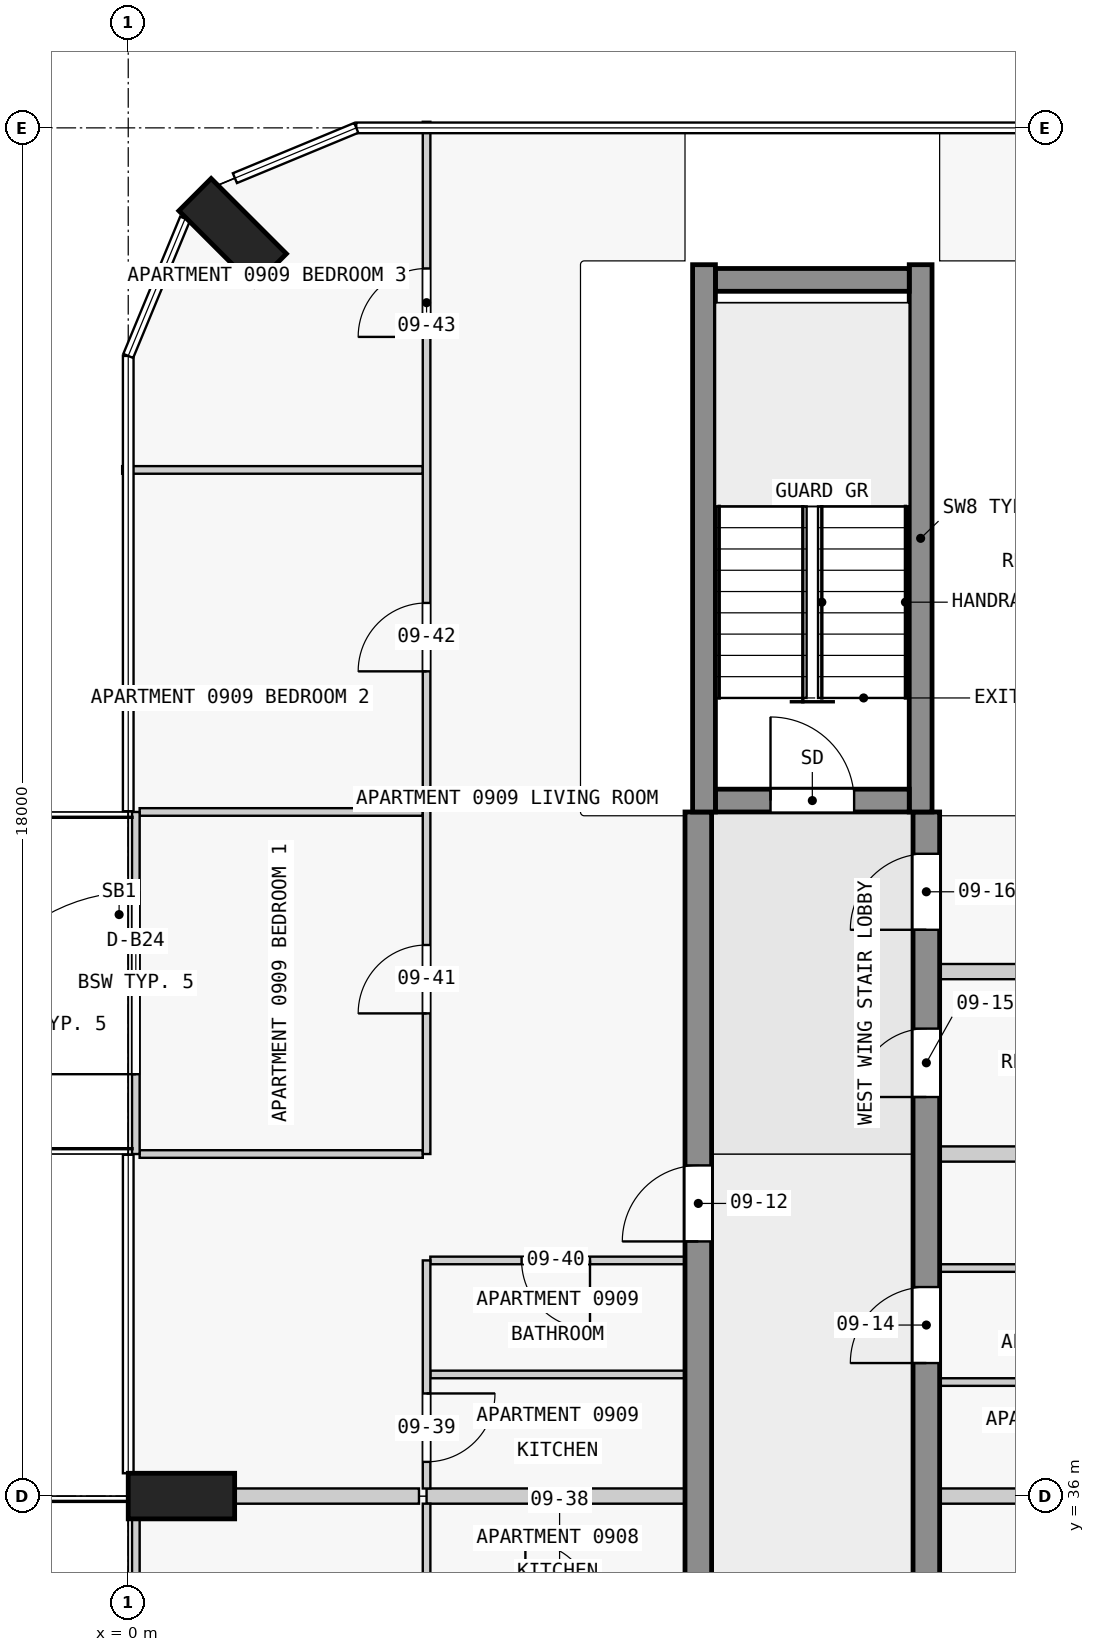
"""IFC4 building model, lengths in metres.
Left out: names, types, materials, properties, quantities, classifications, styles, units other than length and angle.
Written with IfcOpenShell. Run it as: python <this file> out.ifc"""

import sys

from ifc_helpers import new_model, si_unit, direction, frame, frame_2d, origin, origin_2d, place, context, subcontext, project, spatial, rectangle, extrude, element, fill, save


model = new_model("IFC4")
c1 = context("Model", 3, precision=1e-05, world=origin(), true_north=direction((0.0, 1.0)))
c2 = subcontext(c1, "Body", "Model", "MODEL_VIEW")
j1 = project(units=[si_unit("LENGTHUNIT", "METRE"), si_unit("PLANEANGLEUNIT", "RADIAN")], contexts=[c1])
p1 = place(None, origin())
s1 = spatial("IfcSite", under=j1, at=p1, CompositionType="ELEMENT")
p2 = place(p1, origin())
s2 = spatial("IfcBuilding", under=s1, at=p2, CompositionType="ELEMENT")
p3 = place(p2, frame((0.0, 0.0, 40.8)))
s3 = spatial("IfcBuildingStorey", under=s2, at=p3, CompositionType="ELEMENT", Elevation=40.8)
for number, where, z_axis, x_axis in (
    (1, (1.374, 52.626, 0.0), (0.0, 0.0, 1.0), (0.707, 0.707, 0.0)),
    (2, (0.7, 36.0, 0.0), (0.0, 0.0, 1.0), (0.0, 1.0, 0.0)),
):
    element("IfcColumn", number, at=place(p3, frame(where, z_axis=z_axis, x_axis=x_axis)), inside=s3, PredefinedType="COLUMN", context=c2, shape_type="SweptSolid", body=[
        extrude(rectangle(XDim=0.6, YDim=1.4, at=origin_2d()), origin(), (0.0, 0.0, 1.0), 3.5),
    ])
p4 = place(p3, frame((7.725, 45.15, 0.0), z_axis=(0.0, 0.0, 1.0), x_axis=(1.0, 0.0, 0.0)))
e3 = element("IfcWall", 3, at=p4, inside=s3, PredefinedType="SHEAR", context=c2, shape_type="SweptSolid", body=[
    extrude(rectangle(XDim=2.55, YDim=0.3, at=frame_2d((1.275, 0.0))), origin(), (0.0, 0.0, 1.0), 3.5),
])
p5 = place(p4, frame((0.725, 0.0, 0.0)))
e4 = element("IfcOpeningElement", 4, at=p5, cuts=e3, PredefinedType="OPENING", context=c2, shape_type="SweptSolid", body=[
    extrude(rectangle(XDim=1.1, YDim=2.1, at=frame_2d((0.55, 1.05))), frame((0.0, 0.16, 0.0), z_axis=(0.0, -1.0, 0.0), x_axis=(1.0, 0.0, 0.0)), (0.0, 0.0, 1.0), 0.32),
])
p6 = place(p3, frame((7.725, 52.0, 0.0), z_axis=(0.0, 0.0, 1.0), x_axis=(1.0, 0.0, 0.0)))
e5 = element("IfcWall", 5, at=p6, inside=s3, PredefinedType="SHEAR", context=c2, shape_type="SweptSolid", body=[
    extrude(rectangle(XDim=2.55, YDim=0.3, at=frame_2d((1.275, 0.0))), origin(), (0.0, 0.0, 1.0), 3.5),
])
for number, where, z_axis, x_axis in (
    (6, (7.575, 45.0, 0.0), (0.0, 0.0, 1.0), (0.0, 1.0, 0.0)),
    (7, (10.425, 45.0, 0.0), (0.0, 0.0, 1.0), (0.0, 1.0, 0.0)),
):
    element("IfcWall", number, at=place(p3, frame(where, z_axis=z_axis, x_axis=x_axis)), inside=s3, PredefinedType="SHEAR", context=c2, shape_type="SweptSolid", body=[
        extrude(rectangle(XDim=7.2, YDim=0.3, at=frame_2d((3.6, 0.0))), origin(), (0.0, 0.0, 1.0), 3.5),
    ])
p7 = place(p3, frame((7.5, 18.0, 0.0), z_axis=(0.0, 0.0, 1.0), x_axis=(0.0, 1.0, 0.0)))
e8 = element("IfcWall", 8, at=p7, inside=s3, PredefinedType="SHEAR", context=c2, shape_type="SweptSolid", body=[
    extrude(rectangle(XDim=27.0, YDim=0.35, at=frame_2d((13.5, 0.0))), origin(), (0.0, 0.0, 1.0), 3.25),
])
p8 = place(p7, frame((1.75, 0.0, 0.0)))
e9 = element("IfcOpeningElement", 9, at=p8, cuts=e8, PredefinedType="OPENING", context=c2, shape_type="SweptSolid", body=[
    extrude(rectangle(XDim=1.0, YDim=2.1, at=frame_2d((0.5, 1.05))), frame((0.0, 0.185, 0.0), z_axis=(0.0, -1.0, 0.0), x_axis=(1.0, 0.0, 0.0)), (0.0, 0.0, 1.0), 0.37),
])
p9 = place(p7, frame((8.55, 0.0, 0.0)))
e10 = element("IfcOpeningElement", 10, at=p9, cuts=e8, PredefinedType="OPENING", context=c2, shape_type="SweptSolid", body=[
    extrude(rectangle(XDim=1.0, YDim=2.1, at=frame_2d((0.5, 1.05))), frame((0.0, 0.185, 0.0), z_axis=(0.0, -1.0, 0.0), x_axis=(1.0, 0.0, 0.0)), (0.0, 0.0, 1.0), 0.37),
])
p10 = place(p7, frame((15.25, 0.0, 0.0)))
e11 = element("IfcOpeningElement", 11, at=p10, cuts=e8, PredefinedType="OPENING", context=c2, shape_type="SweptSolid", body=[
    extrude(rectangle(XDim=1.0, YDim=2.1, at=frame_2d((0.5, 1.05))), frame((0.0, 0.185, 0.0), z_axis=(0.0, -1.0, 0.0), x_axis=(1.0, 0.0, 0.0)), (0.0, 0.0, 1.0), 0.37),
])
p11 = place(p7, frame((21.35, 0.0, 0.0)))
e12 = element("IfcOpeningElement", 12, at=p11, cuts=e8, PredefinedType="OPENING", context=c2, shape_type="SweptSolid", body=[
    extrude(rectangle(XDim=1.0, YDim=2.1, at=frame_2d((0.5, 1.05))), frame((0.0, 0.185, 0.0), z_axis=(0.0, -1.0, 0.0), x_axis=(1.0, 0.0, 0.0)), (0.0, 0.0, 1.0), 0.37),
])
p12 = place(p3, frame((10.5, 18.0, 0.0), z_axis=(0.0, 0.0, 1.0), x_axis=(0.0, 1.0, 0.0)))
e13 = element("IfcWall", 13, at=p12, inside=s3, PredefinedType="SHEAR", context=c2, shape_type="SweptSolid", body=[
    extrude(rectangle(XDim=27.0, YDim=0.35, at=frame_2d((13.5, 0.0))), origin(), (0.0, 0.0, 1.0), 3.25),
])
p13 = place(p12, frame((7.45, 0.0, 0.0)))
e14 = element("IfcOpeningElement", 14, at=p13, cuts=e13, PredefinedType="OPENING", context=c2, shape_type="SweptSolid", body=[
    extrude(rectangle(XDim=1.0, YDim=2.1, at=frame_2d((0.5, 1.05))), frame((0.0, 0.185, 0.0), z_axis=(0.0, -1.0, 0.0), x_axis=(1.0, 0.0, 0.0)), (0.0, 0.0, 1.0), 0.37),
])
p14 = place(p12, frame((19.75, 0.0, 0.0)))
e15 = element("IfcOpeningElement", 15, at=p14, cuts=e13, PredefinedType="OPENING", context=c2, shape_type="SweptSolid", body=[
    extrude(rectangle(XDim=1.0, YDim=2.1, at=frame_2d((0.5, 1.05))), frame((0.0, 0.185, 0.0), z_axis=(0.0, -1.0, 0.0), x_axis=(1.0, 0.0, 0.0)), (0.0, 0.0, 1.0), 0.37),
])
p15 = place(p12, frame((23.25, 0.0, 0.0)))
e16 = element("IfcOpeningElement", 16, at=p15, cuts=e13, PredefinedType="OPENING", context=c2, shape_type="SweptSolid", body=[
    extrude(rectangle(XDim=0.9, YDim=2.1, at=frame_2d((0.45, 1.05))), frame((0.0, 0.185, 0.0), z_axis=(0.0, -1.0, 0.0), x_axis=(1.0, 0.0, 0.0)), (0.0, 0.0, 1.0), 0.37),
])
p16 = place(p12, frame((25.45, 0.0, 0.0)))
e17 = element("IfcOpeningElement", 17, at=p16, cuts=e13, PredefinedType="OPENING", context=c2, shape_type="SweptSolid", body=[
    extrude(rectangle(XDim=1.0, YDim=2.1, at=frame_2d((0.5, 1.05))), frame((0.0, 0.185, 0.0), z_axis=(0.0, -1.0, 0.0), x_axis=(1.0, 0.0, 0.0)), (0.0, 0.0, 1.0), 0.37),
])
p17 = place(p3, frame((0.1, 31.5, 0.0), z_axis=(0.0, 0.0, 1.0), x_axis=(0.0, 1.0, 0.0)))
e18 = element("IfcWall", 18, at=p17, inside=s3, PredefinedType="STANDARD", context=c2, shape_type="SweptSolid", body=[
    extrude(rectangle(XDim=4.5, YDim=0.1, at=frame_2d((2.25, 0.0))), origin(), (0.0, 0.0, 1.0), 3.25),
])
p18 = place(p17, frame((1.05, 0.0, 0.0)))
e19 = element("IfcOpeningElement", 19, at=p18, cuts=e18, PredefinedType="OPENING", context=c2, shape_type="SweptSolid", body=[
    extrude(rectangle(XDim=2.4, YDim=2.4, at=frame_2d((1.2, 1.2))), frame((0.0, 0.06, 0.0), z_axis=(0.0, -1.0, 0.0), x_axis=(1.0, 0.0, 0.0)), (0.0, 0.0, 1.0), 0.12),
])
p19 = place(p3, frame((0.1, 40.5, 0.0), z_axis=(0.0, 0.0, 1.0), x_axis=(0.0, 1.0, 0.0)))
e20 = element("IfcWall", 20, at=p19, inside=s3, PredefinedType="STANDARD", context=c2, shape_type="SweptSolid", body=[
    extrude(rectangle(XDim=4.5, YDim=0.1, at=frame_2d((2.25, 0.0))), origin(), (0.0, 0.0, 1.0), 3.25),
])
p20 = place(p19, frame((1.05, 0.0, 0.0)))
e21 = element("IfcOpeningElement", 21, at=p20, cuts=e20, PredefinedType="OPENING", context=c2, shape_type="SweptSolid", body=[
    extrude(rectangle(XDim=2.4, YDim=2.4, at=frame_2d((1.2, 1.2))), frame((0.0, 0.06, 0.0), z_axis=(0.0, -1.0, 0.0), x_axis=(1.0, 0.0, 0.0)), (0.0, 0.0, 1.0), 0.12),
])
p21 = place(p3, frame((7.325, 36.0, 0.0), z_axis=(0.0, 0.0, 1.0), x_axis=(-1.0, 0.0, 0.0)))
e22 = element("IfcWall", 22, at=p21, inside=s3, PredefinedType="PARTITIONING", context=c2, shape_type="SweptSolid", body=[
    extrude(rectangle(XDim=3.4, YDim=0.2, at=frame_2d((1.7, 0.0))), origin(), (0.0, 0.0, 1.0), 3.25),
])
p22 = place(p3, frame((16.6, 36.0, 0.0), z_axis=(0.0, 0.0, 1.0), x_axis=(-1.0, 0.0, 0.0)))
e23 = element("IfcWall", 23, at=p22, inside=s3, PredefinedType="PARTITIONING", context=c2, shape_type="SweptSolid", body=[
    extrude(rectangle(XDim=5.925, YDim=0.2, at=frame_2d((2.962, 0.0))), origin(), (0.0, 0.0, 1.0), 3.25),
])
p23 = place(p3, frame((1.4, 36.0, 0.0), z_axis=(0.0, 0.0, 1.0), x_axis=(1.0, 0.0, 0.0)))
e24 = element("IfcWall", 24, at=p23, inside=s3, PredefinedType="PARTITIONING", context=c2, shape_type="SweptSolid", body=[
    extrude(rectangle(XDim=2.425, YDim=0.2, at=frame_2d((1.212, 0.0))), origin(), (0.0, 0.0, 1.0), 3.25),
])
p24 = place(p3, frame((14.025, 37.5, 0.0), z_axis=(0.0, 0.0, 1.0), x_axis=(-1.0, 0.0, 0.0)))
e25 = element("IfcWall", 25, at=p24, inside=s3, PredefinedType="PARTITIONING", context=c2, shape_type="SweptSolid", body=[
    extrude(rectangle(XDim=3.35, YDim=0.1, at=frame_2d((1.675, 0.0))), origin(), (0.0, 0.0, 1.0), 3.25),
])
p25 = place(p24, frame((1.25, 0.0, 0.0)))
e26 = element("IfcOpeningElement", 26, at=p25, cuts=e25, PredefinedType="OPENING", context=c2, shape_type="SweptSolid", body=[
    extrude(rectangle(XDim=0.9, YDim=2.1, at=frame_2d((0.45, 1.05))), frame((0.0, 0.06, 0.0), z_axis=(0.0, -1.0, 0.0), x_axis=(1.0, 0.0, 0.0)), (0.0, 0.0, 1.0), 0.12),
])
p26 = place(p3, frame((7.325, 37.6, 0.0), z_axis=(0.0, 0.0, 1.0), x_axis=(-1.0, 0.0, 0.0)))
e27 = element("IfcWall", 27, at=p26, inside=s3, PredefinedType="PARTITIONING", context=c2, shape_type="SweptSolid", body=[
    extrude(rectangle(XDim=3.35, YDim=0.1, at=frame_2d((1.675, 0.0))), origin(), (0.0, 0.0, 1.0), 3.25),
])
p27 = place(p3, frame((10.675, 39.0, 0.0), z_axis=(0.0, 0.0, 1.0), x_axis=(1.0, 0.0, 0.0)))
e28 = element("IfcWall", 28, at=p27, inside=s3, PredefinedType="PARTITIONING", context=c2, shape_type="SweptSolid", body=[
    extrude(rectangle(XDim=3.4, YDim=0.1, at=frame_2d((1.7, 0.0))), origin(), (0.0, 0.0, 1.0), 3.25),
])
p28 = place(p27, frame((1.25, 0.0, 0.0)))
e29 = element("IfcOpeningElement", 29, at=p28, cuts=e28, PredefinedType="OPENING", context=c2, shape_type="SweptSolid", body=[
    extrude(rectangle(XDim=0.9, YDim=2.1, at=frame_2d((0.45, 1.05))), frame((0.0, 0.06, 0.0), z_axis=(0.0, -1.0, 0.0), x_axis=(1.0, 0.0, 0.0)), (0.0, 0.0, 1.0), 0.12),
])
p29 = place(p3, frame((7.325, 39.1, 0.0), z_axis=(0.0, 0.0, 1.0), x_axis=(-1.0, 0.0, 0.0)))
e30 = element("IfcWall", 30, at=p29, inside=s3, PredefinedType="PARTITIONING", context=c2, shape_type="SweptSolid", body=[
    extrude(rectangle(XDim=3.35, YDim=0.1, at=frame_2d((1.675, 0.0))), origin(), (0.0, 0.0, 1.0), 3.25),
])
p30 = place(p29, frame((1.25, 0.0, 0.0)))
e31 = element("IfcOpeningElement", 31, at=p30, cuts=e30, PredefinedType="OPENING", context=c2, shape_type="SweptSolid", body=[
    extrude(rectangle(XDim=0.9, YDim=2.1, at=frame_2d((0.45, 1.05))), frame((0.0, 0.06, 0.0), z_axis=(0.0, -1.0, 0.0), x_axis=(1.0, 0.0, 0.0)), (0.0, 0.0, 1.0), 0.12),
])
p31 = place(p3, frame((0.15, 40.5, 0.0), z_axis=(0.0, 0.0, 1.0), x_axis=(1.0, 0.0, 0.0)))
e32 = element("IfcWall", 32, at=p31, inside=s3, PredefinedType="PARTITIONING", context=c2, shape_type="SweptSolid", body=[
    extrude(rectangle(XDim=3.725, YDim=0.1, at=frame_2d((1.863, 0.0))), origin(), (0.0, 0.0, 1.0), 3.25),
])
p32 = place(p3, frame((13.975, 40.5, 0.0), z_axis=(0.0, 0.0, 1.0), x_axis=(-1.0, 0.0, 0.0)))
e33 = element("IfcWall", 33, at=p32, inside=s3, PredefinedType="PARTITIONING", context=c2, shape_type="SweptSolid", body=[
    extrude(rectangle(XDim=3.3, YDim=0.2, at=frame_2d((1.65, 0.0))), origin(), (0.0, 0.0, 1.0), 3.25),
])
p33 = place(p3, frame((14.075, 42.9, 0.0), z_axis=(0.0, 0.0, 1.0), x_axis=(-1.0, 0.0, 0.0)))
e34 = element("IfcWall", 34, at=p33, inside=s3, PredefinedType="PARTITIONING", context=c2, shape_type="SweptSolid", body=[
    extrude(rectangle(XDim=3.4, YDim=0.2, at=frame_2d((1.7, 0.0))), origin(), (0.0, 0.0, 1.0), 3.25),
])
p34 = place(p3, frame((3.875, 45.0, 0.0), z_axis=(0.0, 0.0, 1.0), x_axis=(-1.0, 0.0, 0.0)))
e35 = element("IfcWall", 35, at=p34, inside=s3, PredefinedType="PARTITIONING", context=c2, shape_type="SweptSolid", body=[
    extrude(rectangle(XDim=3.725, YDim=0.1, at=frame_2d((1.863, 0.0))), origin(), (0.0, 0.0, 1.0), 3.25),
])
p35 = place(p3, frame((3.875, 49.5, 0.0), z_axis=(0.0, 0.0, 1.0), x_axis=(-1.0, 0.0, 0.0)))
e36 = element("IfcWall", 36, at=p35, inside=s3, PredefinedType="PARTITIONING", context=c2, shape_type="SweptSolid", body=[
    extrude(rectangle(XDim=3.955, YDim=0.1, at=frame_2d((1.978, 0.0))), origin(), (0.0, 0.0, 1.0), 3.25),
])
p36 = place(p3, frame((3.925, 35.9, 0.0), z_axis=(0.0, 0.0, 1.0), x_axis=(0.0, -1.0, 0.0)))
e37 = element("IfcWall", 37, at=p36, inside=s3, PredefinedType="PARTITIONING", context=c2, shape_type="SweptSolid", body=[
    extrude(rectangle(XDim=1.4, YDim=0.1, at=frame_2d((0.7, 0.0))), origin(), (0.0, 0.0, 1.0), 3.25),
])
p37 = place(p3, frame((3.925, 39.1, 0.0), z_axis=(0.0, 0.0, 1.0), x_axis=(0.0, -1.0, 0.0)))
e38 = element("IfcWall", 38, at=p37, inside=s3, PredefinedType="PARTITIONING", context=c2, shape_type="SweptSolid", body=[
    extrude(rectangle(XDim=3.0, YDim=0.1, at=frame_2d((1.5, 0.0))), origin(), (0.0, 0.0, 1.0), 3.25),
])
p38 = place(p37, frame((1.75, 0.0, 0.0)))
e39 = element("IfcOpeningElement", 39, at=p38, cuts=e38, PredefinedType="OPENING", context=c2, shape_type="SweptSolid", body=[
    extrude(rectangle(XDim=0.9, YDim=2.1, at=frame_2d((0.45, 1.05))), frame((0.0, 0.06, 0.0), z_axis=(0.0, -1.0, 0.0), x_axis=(1.0, 0.0, 0.0)), (0.0, 0.0, 1.0), 0.12),
])
p39 = place(p3, frame((3.925, 40.5, 0.0), z_axis=(0.0, 0.0, 1.0), x_axis=(0.0, 1.0, 0.0)))
e40 = element("IfcWall", 40, at=p39, inside=s3, PredefinedType="PARTITIONING", context=c2, shape_type="SweptSolid", body=[
    extrude(rectangle(XDim=13.58, YDim=0.1, at=frame_2d((6.79, 0.0))), origin(), (0.0, 0.0, 1.0), 3.25),
])
p40 = place(p39, frame((1.85, 0.0, 0.0)))
e41 = element("IfcOpeningElement", 41, at=p40, cuts=e40, PredefinedType="OPENING", context=c2, shape_type="SweptSolid", body=[
    extrude(rectangle(XDim=0.9, YDim=2.1, at=frame_2d((0.45, 1.05))), frame((0.0, 0.06, 0.0), z_axis=(0.0, -1.0, 0.0), x_axis=(1.0, 0.0, 0.0)), (0.0, 0.0, 1.0), 0.12),
])
p41 = place(p39, frame((6.35, 0.0, 0.0)))
e42 = element("IfcOpeningElement", 42, at=p41, cuts=e40, PredefinedType="OPENING", context=c2, shape_type="SweptSolid", body=[
    extrude(rectangle(XDim=0.9, YDim=2.1, at=frame_2d((0.45, 1.05))), frame((0.0, 0.06, 0.0), z_axis=(0.0, -1.0, 0.0), x_axis=(1.0, 0.0, 0.0)), (0.0, 0.0, 1.0), 0.12),
])
p42 = place(p39, frame((10.75, 0.0, 0.0)))
e43 = element("IfcOpeningElement", 43, at=p42, cuts=e40, PredefinedType="OPENING", context=c2, shape_type="SweptSolid", body=[
    extrude(rectangle(XDim=0.9, YDim=2.1, at=frame_2d((0.45, 1.05))), frame((0.0, 0.06, 0.0), z_axis=(0.0, -1.0, 0.0), x_axis=(1.0, 0.0, 0.0)), (0.0, 0.0, 1.0), 0.12),
])
p43 = place(p20, origin())
e44 = element("IfcDoor", 44, at=p43, inside=s3, OperationType="SINGLE_SWING_LEFT", PredefinedType="DOOR", context=c2, shape_type="SweptSolid", body=[
    extrude(rectangle(XDim=2.4, YDim=2.4, at=frame_2d((1.2, 1.2))), frame((0.0, 0.025, 0.0), z_axis=(0.0, -1.0, 0.0), x_axis=(1.0, 0.0, 0.0)), (0.0, 0.0, 1.0), 0.05),
])
fill(e21, e44)
p44 = place(p5, origin())
e45 = element("IfcDoor", 45, at=p44, inside=s3, OperationType="SINGLE_SWING_LEFT", PredefinedType="DOOR", context=c2, shape_type="SweptSolid", body=[
    extrude(rectangle(XDim=1.1, YDim=2.1, at=frame_2d((0.55, 1.05))), frame((0.0, 0.025, 0.0), z_axis=(0.0, -1.0, 0.0), x_axis=(1.0, 0.0, 0.0)), (0.0, 0.0, 1.0), 0.05),
])
fill(e4, e45)
p45 = place(p11, origin())
e46 = element("IfcDoor", 46, at=p45, inside=s3, OperationType="SINGLE_SWING_RIGHT", PredefinedType="DOOR", context=c2, shape_type="SweptSolid", body=[
    extrude(rectangle(XDim=1.0, YDim=2.1, at=frame_2d((0.5, 1.05))), frame((0.0, 0.025, 0.0), z_axis=(0.0, -1.0, 0.0), x_axis=(1.0, 0.0, 0.0)), (0.0, 0.0, 1.0), 0.05),
])
fill(e12, e46)
p46 = place(p14, origin())
e47 = element("IfcDoor", 47, at=p46, inside=s3, OperationType="SINGLE_SWING_RIGHT", PredefinedType="DOOR", context=c2, shape_type="SweptSolid", body=[
    extrude(rectangle(XDim=1.0, YDim=2.1, at=frame_2d((0.5, 1.05))), frame((0.0, 0.025, 0.0), z_axis=(0.0, -1.0, 0.0), x_axis=(1.0, 0.0, 0.0)), (0.0, 0.0, 1.0), 0.05),
])
fill(e15, e47)
p47 = place(p15, origin())
e48 = element("IfcDoor", 48, at=p47, inside=s3, OperationType="SINGLE_SWING_RIGHT", PredefinedType="DOOR", context=c2, shape_type="SweptSolid", body=[
    extrude(rectangle(XDim=0.9, YDim=2.1, at=frame_2d((0.45, 1.05))), frame((0.0, 0.025, 0.0), z_axis=(0.0, -1.0, 0.0), x_axis=(1.0, 0.0, 0.0)), (0.0, 0.0, 1.0), 0.05),
])
fill(e16, e48)
p48 = place(p16, origin())
e49 = element("IfcDoor", 49, at=p48, inside=s3, OperationType="SINGLE_SWING_RIGHT", PredefinedType="DOOR", context=c2, shape_type="SweptSolid", body=[
    extrude(rectangle(XDim=1.0, YDim=2.1, at=frame_2d((0.5, 1.05))), frame((0.0, 0.025, 0.0), z_axis=(0.0, -1.0, 0.0), x_axis=(1.0, 0.0, 0.0)), (0.0, 0.0, 1.0), 0.05),
])
fill(e17, e49)
p49 = place(p38, origin())
e50 = element("IfcDoor", 50, at=p49, inside=s3, OperationType="SINGLE_SWING_RIGHT", PredefinedType="DOOR", context=c2, shape_type="SweptSolid", body=[
    extrude(rectangle(XDim=0.9, YDim=2.1, at=frame_2d((0.45, 1.05))), frame((0.0, 0.025, 0.0), z_axis=(0.0, -1.0, 0.0), x_axis=(1.0, 0.0, 0.0)), (0.0, 0.0, 1.0), 0.05),
])
fill(e39, e50)
p50 = place(p30, origin())
e51 = element("IfcDoor", 51, at=p50, inside=s3, OperationType="SINGLE_SWING_RIGHT", PredefinedType="DOOR", context=c2, shape_type="SweptSolid", body=[
    extrude(rectangle(XDim=0.9, YDim=2.1, at=frame_2d((0.45, 1.05))), frame((0.0, 0.025, 0.0), z_axis=(0.0, -1.0, 0.0), x_axis=(1.0, 0.0, 0.0)), (0.0, 0.0, 1.0), 0.05),
])
fill(e31, e51)
p51 = place(p40, origin())
e52 = element("IfcDoor", 52, at=p51, inside=s3, OperationType="SINGLE_SWING_LEFT", PredefinedType="DOOR", context=c2, shape_type="SweptSolid", body=[
    extrude(rectangle(XDim=0.9, YDim=2.1, at=frame_2d((0.45, 1.05))), frame((0.0, 0.025, 0.0), z_axis=(0.0, -1.0, 0.0), x_axis=(1.0, 0.0, 0.0)), (0.0, 0.0, 1.0), 0.05),
])
fill(e41, e52)
p52 = place(p41, origin())
e53 = element("IfcDoor", 53, at=p52, inside=s3, OperationType="SINGLE_SWING_RIGHT", PredefinedType="DOOR", context=c2, shape_type="SweptSolid", body=[
    extrude(rectangle(XDim=0.9, YDim=2.1, at=frame_2d((0.45, 1.05))), frame((0.0, 0.025, 0.0), z_axis=(0.0, -1.0, 0.0), x_axis=(1.0, 0.0, 0.0)), (0.0, 0.0, 1.0), 0.05),
])
fill(e42, e53)
p53 = place(p42, origin())
e54 = element("IfcDoor", 54, at=p53, inside=s3, OperationType="SINGLE_SWING_RIGHT", PredefinedType="DOOR", context=c2, shape_type="SweptSolid", body=[
    extrude(rectangle(XDim=0.9, YDim=2.1, at=frame_2d((0.45, 1.05))), frame((0.0, 0.025, 0.0), z_axis=(0.0, -1.0, 0.0), x_axis=(1.0, 0.0, 0.0)), (0.0, 0.0, 1.0), 0.05),
])
fill(e43, e54)
save(model, sys.argv[1])
